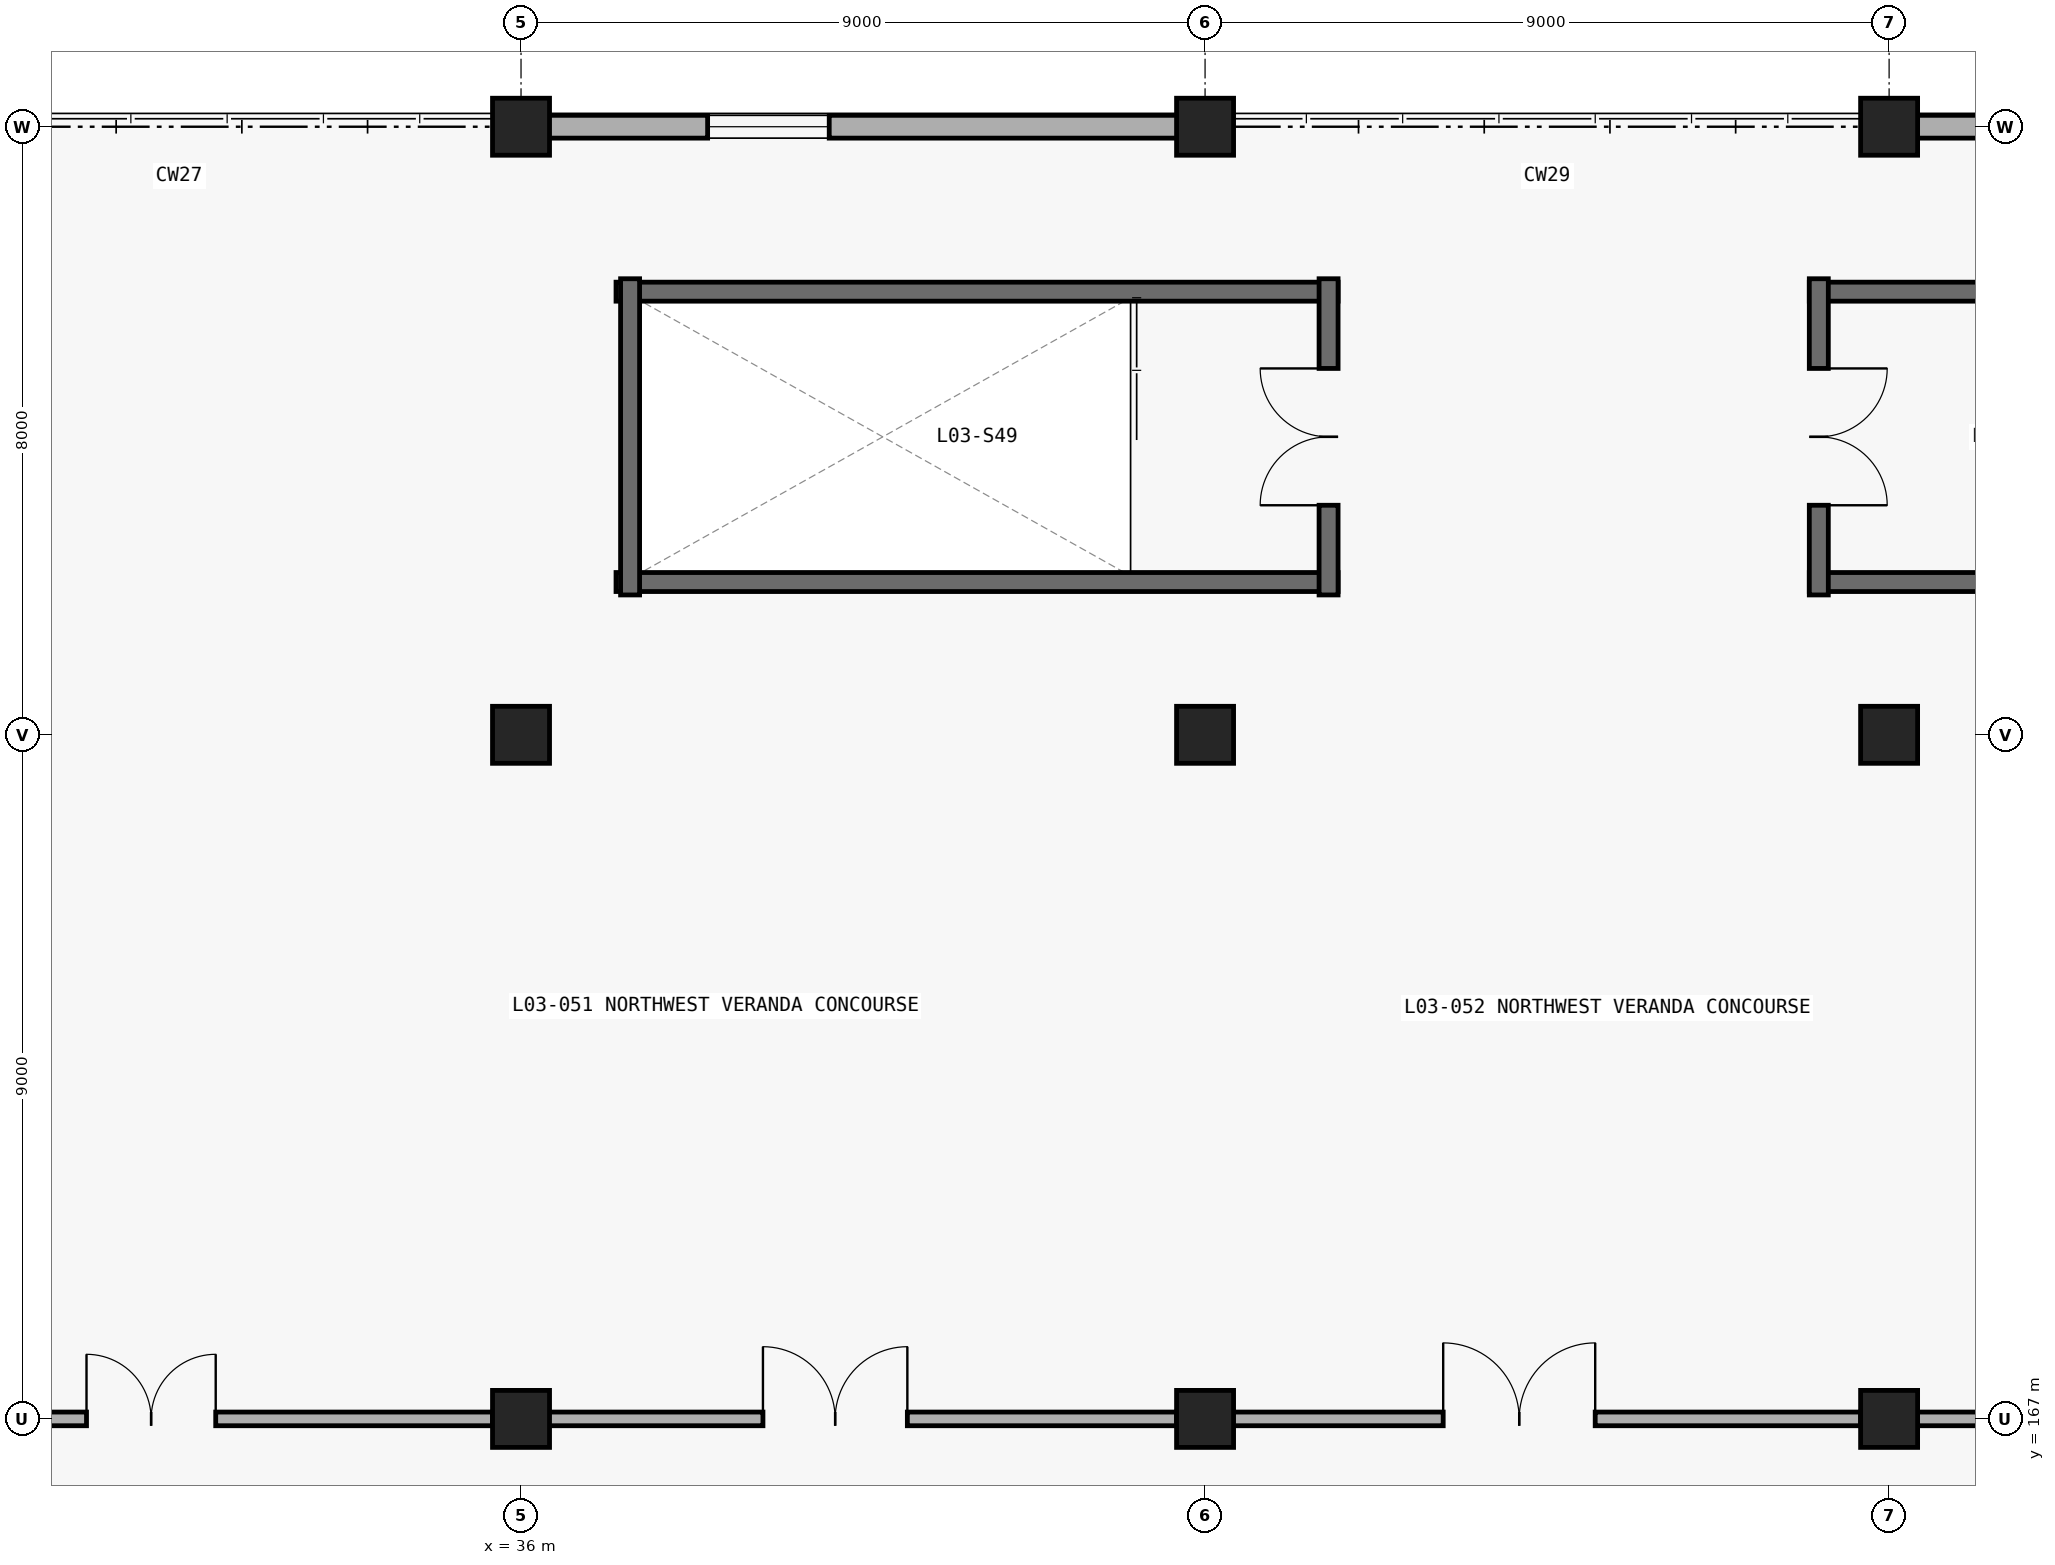
"""IFC4 building model, lengths in metres.
Left out: names, types, materials, properties, quantities, classifications, styles, units other than length and angle.
Written with IfcOpenShell. Run it as: python <this file> out.ifc"""

import sys

from ifc_helpers import new_model, si_unit, direction, frame, frame_2d, origin, origin_2d, place, context, subcontext, project, spatial, rectangle, extrude, element, fill, save


model = new_model("IFC4")
c1 = context("Model", 3, precision=1e-05, world=origin(), true_north=direction((0.0, 1.0)))
c2 = subcontext(c1, "Body", "Model", "MODEL_VIEW")
j1 = project(units=[si_unit("LENGTHUNIT", "METRE"), si_unit("PLANEANGLEUNIT", "RADIAN")], contexts=[c1])
p1 = place(None, origin())
s1 = spatial("IfcSite", under=j1, at=p1, CompositionType="ELEMENT")
p2 = place(p1, origin())
s2 = spatial("IfcBuilding", under=s1, at=p2, CompositionType="ELEMENT")
p3 = place(p2, frame((0.0, 0.0, 15.0)))
s3 = spatial("IfcBuildingStorey", under=s2, at=p3, CompositionType="ELEMENT", Elevation=15.0)
for number, where, z_axis, x_axis in (
    (1, (36.0, 167.0, 0.0), (0.0, 0.0, 1.0), (1.0, 0.0, 0.0)),
    (2, (36.0, 176.0, 0.0), (0.0, 0.0, 1.0), (1.0, 0.0, 0.0)),
    (3, (36.0, 184.0, 0.0), (0.0, 0.0, 1.0), (1.0, 0.0, 0.0)),
    (4, (45.0, 167.0, 0.0), (0.0, 0.0, 1.0), (1.0, 0.0, 0.0)),
    (5, (45.0, 176.0, 0.0), (0.0, 0.0, 1.0), (1.0, 0.0, 0.0)),
    (6, (45.0, 184.0, 0.0), (0.0, 0.0, 1.0), (1.0, 0.0, 0.0)),
    (7, (54.0, 167.0, 0.0), (0.0, 0.0, 1.0), (1.0, 0.0, 0.0)),
    (8, (54.0, 176.0, 0.0), (0.0, 0.0, 1.0), (1.0, 0.0, 0.0)),
    (9, (54.0, 184.0, 0.0), (0.0, 0.0, 1.0), (1.0, 0.0, 0.0)),
):
    element("IfcColumn", number, at=place(p3, frame(where, z_axis=z_axis, x_axis=x_axis)), inside=s3, PredefinedType="COLUMN", context=c2, shape_type="SweptSolid", body=[
        extrude(rectangle(XDim=0.75, YDim=0.75, at=origin_2d()), origin(), (0.0, 0.0, 1.0), 4.8),
    ])
p4 = place(p3, frame((36.35, 184.0, 0.0), z_axis=(0.0, 0.0, 1.0), x_axis=(1.0, 0.0, 0.0)))
e10 = element("IfcWall", 10, at=p4, inside=s3, PredefinedType="STANDARD", context=c2, shape_type="SweptSolid", body=[
    extrude(rectangle(XDim=8.3, YDim=0.3, at=frame_2d((4.15, 0.0))), origin(), (0.0, 0.0, 1.0), 3.823),
])
p5 = place(p4, frame((2.105, 0.0, 0.95)))
e11 = element("IfcOpeningElement", 11, at=p5, cuts=e10, PredefinedType="OPENING", context=c2, shape_type="SweptSolid", body=[
    extrude(rectangle(XDim=1.6, YDim=1.6, at=frame_2d((0.8, 0.8))), frame((0.0, 0.16, 0.0), z_axis=(0.0, -1.0, 0.0), x_axis=(1.0, 0.0, 0.0)), (0.0, 0.0, 1.0), 0.32),
])
p6 = place(p3, frame((54.35, 184.0, 0.0), z_axis=(0.0, 0.0, 1.0), x_axis=(1.0, 0.0, 0.0)))
e12 = element("IfcWall", 12, at=p6, inside=s3, PredefinedType="STANDARD", context=c2, shape_type="SweptSolid", body=[
    extrude(rectangle(XDim=8.3, YDim=0.3, at=frame_2d((4.15, 0.0))), origin(), (0.0, 0.0, 1.0), 3.823),
])
p7 = place(p6, frame((2.23, 0.0, 0.95)))
e13 = element("IfcOpeningElement", 13, at=p7, cuts=e12, PredefinedType="OPENING", context=c2, shape_type="SweptSolid", body=[
    extrude(rectangle(XDim=1.35, YDim=1.9, at=frame_2d((0.675, 0.95))), frame((0.0, 0.16, 0.0), z_axis=(0.0, -1.0, 0.0), x_axis=(1.0, 0.0, 0.0)), (0.0, 0.0, 1.0), 0.32),
])
for number, where, z_axis, x_axis in (
    (14, (46.75, 181.83, 0.0), (0.0, 0.0, 1.0), (-1.0, 0.0, 0.0)),
    (15, (37.25, 178.01, 0.0), (0.0, 0.0, 1.0), (1.0, 0.0, 0.0)),
):
    element("IfcWall", number, at=place(p3, frame(where, z_axis=z_axis, x_axis=x_axis)), inside=s3, PredefinedType="SHEAR", context=c2, shape_type="SweptSolid", body=[
        extrude(rectangle(XDim=9.5, YDim=0.25, at=frame_2d((4.75, 0.0))), origin(), (0.0, 0.0, 1.0), 4.54),
    ])
p8 = place(p3, frame((46.625, 177.84, 0.0), z_axis=(0.0, 0.0, 1.0), x_axis=(0.0, 1.0, 0.0)))
e16 = element("IfcWall", 16, at=p8, inside=s3, PredefinedType="SHEAR", context=c2, shape_type="SweptSolid", body=[
    extrude(rectangle(XDim=4.16, YDim=0.25, at=frame_2d((2.08, 0.0))), origin(), (0.0, 0.0, 1.0), 4.54),
])
p9 = place(p8, frame((1.18, 0.0, 0.0)))
e17 = element("IfcOpeningElement", 17, at=p9, cuts=e16, PredefinedType="OPENING", context=c2, shape_type="SweptSolid", body=[
    extrude(rectangle(XDim=1.8, YDim=2.25, at=frame_2d((0.9, 1.125))), frame((0.0, 0.135, 0.0), z_axis=(0.0, -1.0, 0.0), x_axis=(1.0, 0.0, 0.0)), (0.0, 0.0, 1.0), 0.27),
])
p10 = place(p3, frame((37.435, 182.0, 0.0), z_axis=(0.0, 0.0, 1.0), x_axis=(0.0, -1.0, 0.0)))
e18 = element("IfcWall", 18, at=p10, inside=s3, PredefinedType="SHEAR", context=c2, shape_type="SweptSolid", body=[
    extrude(rectangle(XDim=4.16, YDim=0.25, at=frame_2d((2.08, 0.0))), origin(), (0.0, 0.0, 1.0), 4.54),
])
for number, where, z_axis, x_axis in (
    (19, (52.95, 178.01, 0.0), (0.0, 0.0, 1.0), (1.0, 0.0, 0.0)),
    (20, (62.45, 181.83, 0.0), (0.0, 0.0, 1.0), (-1.0, 0.0, 0.0)),
):
    element("IfcWall", number, at=place(p3, frame(where, z_axis=z_axis, x_axis=x_axis)), inside=s3, PredefinedType="SHEAR", context=c2, shape_type="SweptSolid", body=[
        extrude(rectangle(XDim=9.5, YDim=0.25, at=frame_2d((4.75, 0.0))), origin(), (0.0, 0.0, 1.0), 4.54),
    ])
p11 = place(p3, frame((53.075, 182.0, 0.0), z_axis=(0.0, 0.0, 1.0), x_axis=(0.0, -1.0, 0.0)))
e21 = element("IfcWall", 21, at=p11, inside=s3, PredefinedType="SHEAR", context=c2, shape_type="SweptSolid", body=[
    extrude(rectangle(XDim=4.16, YDim=0.25, at=frame_2d((2.08, 0.0))), origin(), (0.0, 0.0, 1.0), 4.54),
])
p12 = place(p11, frame((1.18, 0.0, 0.0)))
e22 = element("IfcOpeningElement", 22, at=p12, cuts=e21, PredefinedType="OPENING", context=c2, shape_type="SweptSolid", body=[
    extrude(rectangle(XDim=1.8, YDim=2.25, at=frame_2d((0.9, 1.125))), frame((0.0, 0.135, 0.0), z_axis=(0.0, -1.0, 0.0), x_axis=(1.0, 0.0, 0.0)), (0.0, 0.0, 1.0), 0.27),
])
p13 = place(p3, frame((26.625, 167.0, 0.0), z_axis=(0.0, 0.0, 1.0), x_axis=(1.0, 0.0, 0.0)))
e23 = element("IfcWall", 23, at=p13, inside=s3, PredefinedType="PARTITIONING", context=c2, shape_type="SweptSolid", body=[
    extrude(rectangle(XDim=9.015, YDim=0.18, at=frame_2d((4.507, 0.0))), origin(), (0.0, 0.0, 1.0), 3.823),
])
p14 = place(p13, frame((3.658, 0.0, 0.0)))
e24 = element("IfcOpeningElement", 24, at=p14, cuts=e23, PredefinedType="OPENING", context=c2, shape_type="SweptSolid", body=[
    extrude(rectangle(XDim=1.7, YDim=2.2, at=frame_2d((0.85, 1.1))), frame((0.0, 0.1, 0.0), z_axis=(0.0, -1.0, 0.0), x_axis=(1.0, 0.0, 0.0)), (0.0, 0.0, 1.0), 0.2),
])
p15 = place(p3, frame((35.625, 167.0, 0.0), z_axis=(0.0, 0.0, 1.0), x_axis=(1.0, 0.0, 0.0)))
e25 = element("IfcWall", 25, at=p15, inside=s3, PredefinedType="PARTITIONING", context=c2, shape_type="SweptSolid", body=[
    extrude(rectangle(XDim=9.015, YDim=0.18, at=frame_2d((4.507, 0.0))), origin(), (0.0, 0.0, 1.0), 3.823),
])
p16 = place(p15, frame((3.558, 0.0, 0.0)))
e26 = element("IfcOpeningElement", 26, at=p16, cuts=e25, PredefinedType="OPENING", context=c2, shape_type="SweptSolid", body=[
    extrude(rectangle(XDim=1.9, YDim=2.25, at=frame_2d((0.95, 1.125))), frame((0.0, 0.1, 0.0), z_axis=(0.0, -1.0, 0.0), x_axis=(1.0, 0.0, 0.0)), (0.0, 0.0, 1.0), 0.2),
])
p17 = place(p3, frame((44.625, 167.0, 0.0), z_axis=(0.0, 0.0, 1.0), x_axis=(1.0, 0.0, 0.0)))
e27 = element("IfcWall", 27, at=p17, inside=s3, PredefinedType="PARTITIONING", context=c2, shape_type="SweptSolid", body=[
    extrude(rectangle(XDim=9.015, YDim=0.18, at=frame_2d((4.507, 0.0))), origin(), (0.0, 0.0, 1.0), 3.823),
])
p18 = place(p17, frame((3.508, 0.0, 0.0)))
e28 = element("IfcOpeningElement", 28, at=p18, cuts=e27, PredefinedType="OPENING", context=c2, shape_type="SweptSolid", body=[
    extrude(rectangle(XDim=2.0, YDim=2.3, at=frame_2d((1.0, 1.15))), frame((0.0, 0.1, 0.0), z_axis=(0.0, -1.0, 0.0), x_axis=(1.0, 0.0, 0.0)), (0.0, 0.0, 1.0), 0.2),
])
p19 = place(p3, frame((53.625, 167.0, 0.0), z_axis=(0.0, 0.0, 1.0), x_axis=(1.0, 0.0, 0.0)))
e29 = element("IfcWall", 29, at=p19, inside=s3, PredefinedType="PARTITIONING", context=c2, shape_type="SweptSolid", body=[
    extrude(rectangle(XDim=9.015, YDim=0.18, at=frame_2d((4.507, 0.0))), origin(), (0.0, 0.0, 1.0), 3.823),
])
p20 = place(p19, frame((3.458, 0.0, 0.0)))
e30 = element("IfcOpeningElement", 30, at=p20, cuts=e29, PredefinedType="OPENING", context=c2, shape_type="SweptSolid", body=[
    extrude(rectangle(XDim=2.1, YDim=2.35, at=frame_2d((1.05, 1.175))), frame((0.0, 0.1, 0.0), z_axis=(0.0, -1.0, 0.0), x_axis=(1.0, 0.0, 0.0)), (0.0, 0.0, 1.0), 0.2),
])
p21 = place(p5, origin())
e31 = element("IfcWindow", 31, at=p21, inside=s3, PartitioningType="SINGLE_PANEL", PredefinedType="WINDOW", context=c2, shape_type="SweptSolid", body=[
    extrude(rectangle(XDim=1.6, YDim=1.6, at=frame_2d((0.8, 0.8))), frame((0.0, 0.03, 0.0), z_axis=(0.0, -1.0, 0.0), x_axis=(1.0, 0.0, 0.0)), (0.0, 0.0, 1.0), 0.06),
])
fill(e11, e31)
p22 = place(p9, origin())
e32 = element("IfcDoor", 32, at=p22, inside=s3, OperationType="DOUBLE_DOOR_SINGLE_SWING", PredefinedType="DOOR", context=c2, shape_type="SweptSolid", body=[
    extrude(rectangle(XDim=1.8, YDim=2.25, at=frame_2d((0.9, 1.125))), frame((0.0, 0.025, 0.0), z_axis=(0.0, -1.0, 0.0), x_axis=(1.0, 0.0, 0.0)), (0.0, 0.0, 1.0), 0.05),
])
fill(e17, e32)
p23 = place(p12, origin())
e33 = element("IfcDoor", 33, at=p23, inside=s3, OperationType="DOUBLE_DOOR_SINGLE_SWING", PredefinedType="DOOR", context=c2, shape_type="SweptSolid", body=[
    extrude(rectangle(XDim=1.8, YDim=2.25, at=frame_2d((0.9, 1.125))), frame((0.0, 0.025, 0.0), z_axis=(0.0, -1.0, 0.0), x_axis=(1.0, 0.0, 0.0)), (0.0, 0.0, 1.0), 0.05),
])
fill(e22, e33)
p24 = place(p14, origin())
e34 = element("IfcDoor", 34, at=p24, inside=s3, OperationType="DOUBLE_DOOR_SINGLE_SWING", PredefinedType="DOOR", context=c2, shape_type="SweptSolid", body=[
    extrude(rectangle(XDim=1.7, YDim=2.2, at=frame_2d((0.85, 1.1))), frame((0.0, 0.025, 0.0), z_axis=(0.0, -1.0, 0.0), x_axis=(1.0, 0.0, 0.0)), (0.0, 0.0, 1.0), 0.05),
])
fill(e24, e34)
p25 = place(p16, origin())
e35 = element("IfcDoor", 35, at=p25, inside=s3, OperationType="DOUBLE_DOOR_SINGLE_SWING", PredefinedType="DOOR", context=c2, shape_type="SweptSolid", body=[
    extrude(rectangle(XDim=1.9, YDim=2.25, at=frame_2d((0.95, 1.125))), frame((0.0, 0.025, 0.0), z_axis=(0.0, -1.0, 0.0), x_axis=(1.0, 0.0, 0.0)), (0.0, 0.0, 1.0), 0.05),
])
fill(e26, e35)
p26 = place(p18, origin())
e36 = element("IfcDoor", 36, at=p26, inside=s3, OperationType="DOUBLE_DOOR_SINGLE_SWING", PredefinedType="DOOR", context=c2, shape_type="SweptSolid", body=[
    extrude(rectangle(XDim=2.0, YDim=2.3, at=frame_2d((1.0, 1.15))), frame((0.0, 0.025, 0.0), z_axis=(0.0, -1.0, 0.0), x_axis=(1.0, 0.0, 0.0)), (0.0, 0.0, 1.0), 0.05),
])
fill(e28, e36)
save(model, sys.argv[1])
